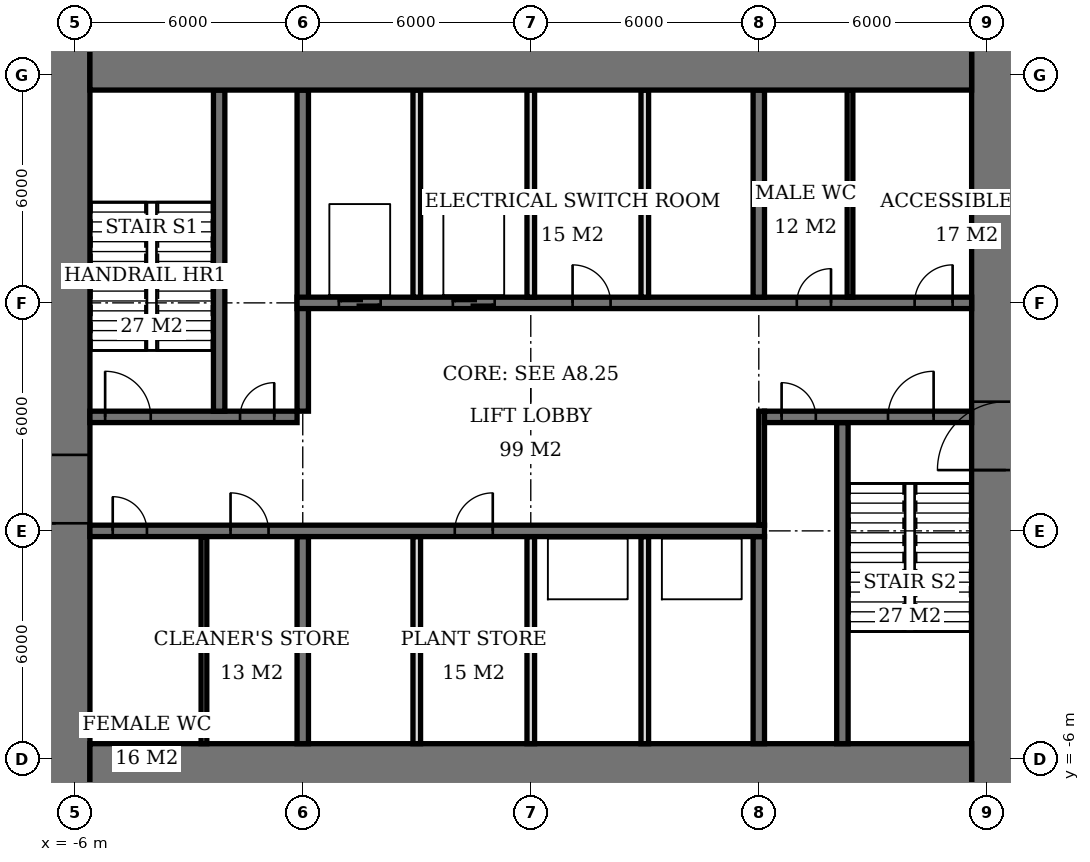
"""IFC4 building model, lengths in metres.
Left out: names, types, materials, properties, quantities, classifications, styles, units other than length and angle.
Written with IfcOpenShell. Run it as: python <this file> out.ifc"""

import sys

from ifc_helpers import new_model, si_unit, direction, frame, frame_2d, origin, place, context, subcontext, project, spatial, rectangle, extrude, element, fill, save


model = new_model("IFC4")
c1 = context("Model", 3, precision=1e-05, world=origin(), true_north=direction((0.0, 1.0)))
c2 = subcontext(c1, "Body", "Model", "MODEL_VIEW")
j1 = project(units=[si_unit("LENGTHUNIT", "METRE"), si_unit("PLANEANGLEUNIT", "RADIAN")], contexts=[c1])
p1 = place(None, origin())
s1 = spatial("IfcSite", under=j1, at=p1, CompositionType="ELEMENT")
p2 = place(p1, origin())
s2 = spatial("IfcBuilding", under=s1, at=p2, CompositionType="ELEMENT")
p3 = place(p2, frame((0.0, 0.0, 164.0)))
s3 = spatial("IfcBuildingStorey", under=s2, at=p3, CompositionType="ELEMENT", Elevation=164.0)
for number, where, z_axis, x_axis in (
    (1, (-5.6, -6.6, 0.0), (0.0, 0.0, 1.0), (1.0, 0.0, 0.0)),
    (2, (-5.6, 12.6, 0.0), (0.0, 0.0, 1.0), (1.0, 0.0, 0.0)),
):
    element("IfcWall", number, at=place(p3, frame(where, z_axis=z_axis, x_axis=x_axis)), inside=s3, PredefinedType="SHEAR", context=c2, shape_type="SweptSolid", body=[
        extrude(rectangle(XDim=23.2, YDim=2.0, at=frame_2d((11.6, 0.0))), origin(), (0.0, 0.0, 1.0), 5.4),
    ])
p4 = place(p3, frame((-6.5, -7.6, 0.0), z_axis=(0.0, 0.0, 1.0), x_axis=(0.0, 1.0, 0.0)))
e3 = element("IfcWall", 3, at=p4, inside=s3, PredefinedType="SHEAR", context=c2, shape_type="SweptSolid", body=[
    extrude(rectangle(XDim=21.2, YDim=1.8, at=frame_2d((10.6, 0.0))), origin(), (0.0, 0.0, 1.0), 5.4),
])
p5 = place(p4, frame((7.8, 0.0, 0.0)))
e4 = element("IfcOpeningElement", 4, at=p5, cuts=e3, PredefinedType="OPENING", context=c2, shape_type="SweptSolid", body=[
    extrude(rectangle(XDim=1.8, YDim=2.4, at=frame_2d((0.9, 1.2))), frame((0.0, 0.91, 0.0), z_axis=(0.0, -1.0, 0.0), x_axis=(1.0, 0.0, 0.0)), (0.0, 0.0, 1.0), 1.82),
])
p6 = place(p3, frame((18.5, -7.6, 0.0), z_axis=(0.0, 0.0, 1.0), x_axis=(0.0, 1.0, 0.0)))
e5 = element("IfcWall", 5, at=p6, inside=s3, PredefinedType="SHEAR", context=c2, shape_type="SweptSolid", body=[
    extrude(rectangle(XDim=21.2, YDim=1.8, at=frame_2d((10.6, 0.0))), origin(), (0.0, 0.0, 1.0), 5.4),
])
p7 = place(p6, frame((9.2, 0.0, 0.0)))
e6 = element("IfcOpeningElement", 6, at=p7, cuts=e5, PredefinedType="OPENING", context=c2, shape_type="SweptSolid", body=[
    extrude(rectangle(XDim=1.8, YDim=2.4, at=frame_2d((0.9, 1.2))), frame((0.0, 0.91, 0.0), z_axis=(0.0, -1.0, 0.0), x_axis=(1.0, 0.0, 0.0)), (0.0, 0.0, 1.0), 1.82),
])
p8 = place(p3, frame((-5.6, 0.0, 0.0), z_axis=(0.0, 0.0, 1.0), x_axis=(1.0, 0.0, 0.0)))
e7 = element("IfcWall", 7, at=p8, inside=s3, PredefinedType="SHEAR", context=c2, shape_type="SweptSolid", body=[
    extrude(rectangle(XDim=17.75, YDim=0.3, at=frame_2d((8.875, 0.0))), origin(), (0.0, 0.0, 1.0), 5.4),
])
p9 = place(p8, frame((0.6, 0.0, 0.0)))
e8 = element("IfcOpeningElement", 8, at=p9, cuts=e7, PredefinedType="OPENING", context=c2, shape_type="SweptSolid", body=[
    extrude(rectangle(XDim=0.9, YDim=2.1, at=frame_2d((0.45, 1.05))), frame((0.0, 0.16, 0.0), z_axis=(0.0, -1.0, 0.0), x_axis=(1.0, 0.0, 0.0)), (0.0, 0.0, 1.0), 0.32),
])
p10 = place(p8, frame((3.7, 0.0, 0.0)))
e9 = element("IfcOpeningElement", 9, at=p10, cuts=e7, PredefinedType="OPENING", context=c2, shape_type="SweptSolid", body=[
    extrude(rectangle(XDim=1.0, YDim=2.1, at=frame_2d((0.5, 1.05))), frame((0.0, 0.16, 0.0), z_axis=(0.0, -1.0, 0.0), x_axis=(1.0, 0.0, 0.0)), (0.0, 0.0, 1.0), 0.32),
])
p11 = place(p8, frame((9.6, 0.0, 0.0)))
e10 = element("IfcOpeningElement", 10, at=p11, cuts=e7, PredefinedType="OPENING", context=c2, shape_type="SweptSolid", body=[
    extrude(rectangle(XDim=1.0, YDim=2.1, at=frame_2d((0.5, 1.05))), frame((0.0, 0.16, 0.0), z_axis=(0.0, -1.0, 0.0), x_axis=(1.0, 0.0, 0.0)), (0.0, 0.0, 1.0), 0.32),
])
p12 = place(p3, frame((-5.6, 3.0, 0.0), z_axis=(0.0, 0.0, 1.0), x_axis=(1.0, 0.0, 0.0)))
e11 = element("IfcWall", 11, at=p12, inside=s3, PredefinedType="SHEAR", context=c2, shape_type="SweptSolid", body=[
    extrude(rectangle(XDim=5.45, YDim=0.3, at=frame_2d((2.725, 0.0))), origin(), (0.0, 0.0, 1.0), 5.4),
])
p13 = place(p12, frame((0.4, 0.0, 0.0)))
e12 = element("IfcOpeningElement", 12, at=p13, cuts=e11, PredefinedType="OPENING", context=c2, shape_type="SweptSolid", body=[
    extrude(rectangle(XDim=1.2, YDim=2.1, at=frame_2d((0.6, 1.05))), frame((0.0, 0.16, 0.0), z_axis=(0.0, -1.0, 0.0), x_axis=(1.0, 0.0, 0.0)), (0.0, 0.0, 1.0), 0.32),
])
p14 = place(p12, frame((3.95, 0.0, 0.0)))
e13 = element("IfcOpeningElement", 13, at=p14, cuts=e11, PredefinedType="OPENING", context=c2, shape_type="SweptSolid", body=[
    extrude(rectangle(XDim=0.9, YDim=2.1, at=frame_2d((0.45, 1.05))), frame((0.0, 0.16, 0.0), z_axis=(0.0, -1.0, 0.0), x_axis=(1.0, 0.0, 0.0)), (0.0, 0.0, 1.0), 0.32),
])
p15 = place(p3, frame((12.15, 3.0, 0.0), z_axis=(0.0, 0.0, 1.0), x_axis=(1.0, 0.0, 0.0)))
e14 = element("IfcWall", 14, at=p15, inside=s3, PredefinedType="SHEAR", context=c2, shape_type="SweptSolid", body=[
    extrude(rectangle(XDim=5.45, YDim=0.3, at=frame_2d((2.725, 0.0))), origin(), (0.0, 0.0, 1.0), 5.4),
])
p16 = place(p15, frame((3.25, 0.0, 0.0)))
e15 = element("IfcOpeningElement", 15, at=p16, cuts=e14, PredefinedType="OPENING", context=c2, shape_type="SweptSolid", body=[
    extrude(rectangle(XDim=1.2, YDim=2.1, at=frame_2d((0.6, 1.05))), frame((0.0, 0.16, 0.0), z_axis=(0.0, -1.0, 0.0), x_axis=(1.0, 0.0, 0.0)), (0.0, 0.0, 1.0), 0.32),
])
p17 = place(p15, frame((0.45, 0.0, 0.0)))
e16 = element("IfcOpeningElement", 16, at=p17, cuts=e14, PredefinedType="OPENING", context=c2, shape_type="SweptSolid", body=[
    extrude(rectangle(XDim=0.9, YDim=2.1, at=frame_2d((0.45, 1.05))), frame((0.0, 0.16, 0.0), z_axis=(0.0, -1.0, 0.0), x_axis=(1.0, 0.0, 0.0)), (0.0, 0.0, 1.0), 0.32),
])
p18 = place(p3, frame((-0.15, 6.0, 0.0), z_axis=(0.0, 0.0, 1.0), x_axis=(1.0, 0.0, 0.0)))
e17 = element("IfcWall", 17, at=p18, inside=s3, PredefinedType="SHEAR", context=c2, shape_type="SweptSolid", body=[
    extrude(rectangle(XDim=17.75, YDim=0.3, at=frame_2d((8.875, 0.0))), origin(), (0.0, 0.0, 1.0), 5.4),
])
p19 = place(p18, frame((13.15, 0.0, 0.0)))
e18 = element("IfcOpeningElement", 18, at=p19, cuts=e17, PredefinedType="OPENING", context=c2, shape_type="SweptSolid", body=[
    extrude(rectangle(XDim=0.9, YDim=2.1, at=frame_2d((0.45, 1.05))), frame((0.0, 0.16, 0.0), z_axis=(0.0, -1.0, 0.0), x_axis=(1.0, 0.0, 0.0)), (0.0, 0.0, 1.0), 0.32),
])
p20 = place(p18, frame((16.25, 0.0, 0.0)))
e19 = element("IfcOpeningElement", 19, at=p20, cuts=e17, PredefinedType="OPENING", context=c2, shape_type="SweptSolid", body=[
    extrude(rectangle(XDim=1.0, YDim=2.1, at=frame_2d((0.5, 1.05))), frame((0.0, 0.16, 0.0), z_axis=(0.0, -1.0, 0.0), x_axis=(1.0, 0.0, 0.0)), (0.0, 0.0, 1.0), 0.32),
])
p21 = place(p18, frame((7.25, 0.0, 0.0)))
e20 = element("IfcOpeningElement", 20, at=p21, cuts=e17, PredefinedType="OPENING", context=c2, shape_type="SweptSolid", body=[
    extrude(rectangle(XDim=1.0, YDim=2.1, at=frame_2d((0.5, 1.05))), frame((0.0, 0.16, 0.0), z_axis=(0.0, -1.0, 0.0), x_axis=(1.0, 0.0, 0.0)), (0.0, 0.0, 1.0), 0.32),
])
p22 = place(p18, frame((1.1, 0.0, 0.0)))
e21 = element("IfcOpeningElement", 21, at=p22, cuts=e17, PredefinedType="OPENING", context=c2, shape_type="SweptSolid", body=[
    extrude(rectangle(XDim=1.1, YDim=2.1, at=frame_2d((0.55, 1.05))), frame((0.0, 0.16, 0.0), z_axis=(0.0, -1.0, 0.0), x_axis=(1.0, 0.0, 0.0)), (0.0, 0.0, 1.0), 0.32),
])
p23 = place(p18, frame((4.1, 0.0, 0.0)))
e22 = element("IfcOpeningElement", 22, at=p23, cuts=e17, PredefinedType="OPENING", context=c2, shape_type="SweptSolid", body=[
    extrude(rectangle(XDim=1.1, YDim=2.1, at=frame_2d((0.55, 1.05))), frame((0.0, 0.16, 0.0), z_axis=(0.0, -1.0, 0.0), x_axis=(1.0, 0.0, 0.0)), (0.0, 0.0, 1.0), 0.32),
])
p24 = place(p3, frame((0.0, -5.6, 0.0), z_axis=(0.0, 0.0, 1.0), x_axis=(0.0, 1.0, 0.0)))
e23 = element("IfcWall", 23, at=p24, inside=s3, PredefinedType="SHEAR", context=c2, shape_type="SweptSolid", body=[
    extrude(rectangle(XDim=5.45, YDim=0.3, at=frame_2d((2.725, 0.0))), origin(), (0.0, 0.0, 1.0), 5.4),
])
p25 = place(p3, frame((0.0, 3.15, 0.0), z_axis=(0.0, 0.0, 1.0), x_axis=(0.0, 1.0, 0.0)))
e24 = element("IfcWall", 24, at=p25, inside=s3, PredefinedType="SHEAR", context=c2, shape_type="SweptSolid", body=[
    extrude(rectangle(XDim=8.45, YDim=0.3, at=frame_2d((4.225, 0.0))), origin(), (0.0, 0.0, 1.0), 5.4),
])
for number, where, z_axis, x_axis in (
    (25, (12.0, -5.6, 0.0), (0.0, 0.0, 1.0), (0.0, 1.0, 0.0)),
    (26, (12.0, 6.15, 0.0), (0.0, 0.0, 1.0), (0.0, 1.0, 0.0)),
):
    element("IfcWall", number, at=place(p3, frame(where, z_axis=z_axis, x_axis=x_axis)), inside=s3, PredefinedType="SHEAR", context=c2, shape_type="SweptSolid", body=[
        extrude(rectangle(XDim=5.45, YDim=0.3, at=frame_2d((2.725, 0.0))), origin(), (0.0, 0.0, 1.0), 5.4),
    ])
for number, where, z_axis, x_axis in (
    (27, (-2.2, 3.15, 0.0), (0.0, 0.0, 1.0), (0.0, 1.0, 0.0)),
    (28, (14.2, -5.6, 0.0), (0.0, 0.0, 1.0), (0.0, 1.0, 0.0)),
):
    element("IfcWall", number, at=place(p3, frame(where, z_axis=z_axis, x_axis=x_axis)), inside=s3, PredefinedType="SHEAR", context=c2, shape_type="SweptSolid", body=[
        extrude(rectangle(XDim=8.45, YDim=0.3, at=frame_2d((4.225, 0.0))), origin(), (0.0, 0.0, 1.0), 5.4),
    ])
for number, where, z_axis, x_axis in (
    (29, (3.0, 6.15, 0.0), (0.0, 0.0, 1.0), (0.0, 1.0, 0.0)),
    (30, (6.0, 6.15, 0.0), (0.0, 0.0, 1.0), (0.0, 1.0, 0.0)),
    (31, (9.0, 6.15, 0.0), (0.0, 0.0, 1.0), (0.0, 1.0, 0.0)),
    (32, (3.0, -5.6, 0.0), (0.0, 0.0, 1.0), (0.0, 1.0, 0.0)),
    (33, (6.0, -5.6, 0.0), (0.0, 0.0, 1.0), (0.0, 1.0, 0.0)),
    (34, (9.0, -5.6, 0.0), (0.0, 0.0, 1.0), (0.0, 1.0, 0.0)),
):
    element("IfcWall", number, at=place(p3, frame(where, z_axis=z_axis, x_axis=x_axis)), inside=s3, PredefinedType="SOLIDWALL", context=c2, shape_type="SweptSolid", body=[
        extrude(rectangle(XDim=5.45, YDim=0.2, at=frame_2d((2.725, 0.0))), origin(), (0.0, 0.0, 1.0), 5.4),
    ])
p26 = place(p3, frame((-13.329, -6.651, 0.0), z_axis=(0.0, 0.0, 1.0), x_axis=(0.707106781187, -0.707106781187, 0.0)))
e35 = element("IfcWall", 35, at=p26, inside=s3, PredefinedType="USERDEFINED", context=c2, shape_type="SweptSolid", body=[
    extrude(rectangle(XDim=9.445, YDim=0.2, at=frame_2d((4.723, 0.0))), origin(), (0.0, 0.0, 1.0), 5.4),
])
p27 = place(p26, frame((0.274, 0.0, 0.6)))
e36 = element("IfcOpeningElement", 36, at=p27, cuts=e35, PredefinedType="OPENING", context=c2, shape_type="SweptSolid", body=[
    extrude(rectangle(XDim=2.6, YDim=3.0, at=frame_2d((1.3, 1.5))), frame((0.0, 0.11, 0.0), z_axis=(0.0, -1.0, 0.0), x_axis=(1.0, 0.0, 0.0)), (0.0, 0.0, 1.0), 0.22),
])
p28 = place(p26, frame((3.423, 0.0, 0.6)))
e37 = element("IfcOpeningElement", 37, at=p28, cuts=e35, PredefinedType="OPENING", context=c2, shape_type="SweptSolid", body=[
    extrude(rectangle(XDim=2.6, YDim=3.0, at=frame_2d((1.3, 1.5))), frame((0.0, 0.11, 0.0), z_axis=(0.0, -1.0, 0.0), x_axis=(1.0, 0.0, 0.0)), (0.0, 0.0, 1.0), 0.22),
])
p29 = place(p26, frame((6.571, 0.0, 0.6)))
e38 = element("IfcOpeningElement", 38, at=p29, cuts=e35, PredefinedType="OPENING", context=c2, shape_type="SweptSolid", body=[
    extrude(rectangle(XDim=2.6, YDim=3.0, at=frame_2d((1.3, 1.5))), frame((0.0, 0.11, 0.0), z_axis=(0.0, -1.0, 0.0), x_axis=(1.0, 0.0, 0.0)), (0.0, 0.0, 1.0), 0.22),
])
for number, where, z_axis, x_axis in (
    (39, (-2.6, -5.6, 0.0), (0.0, 0.0, 1.0), (0.0, 1.0, 0.0)),
    (40, (14.4, 6.15, 0.0), (0.0, 0.0, 1.0), (0.0, 1.0, 0.0)),
):
    element("IfcWall", number, at=place(p3, frame(where, z_axis=z_axis, x_axis=x_axis)), inside=s3, PredefinedType="PLUMBINGWALL", context=c2, shape_type="SweptSolid", body=[
        extrude(rectangle(XDim=5.45, YDim=0.15, at=frame_2d((2.725, 0.0))), origin(), (0.0, 0.0, 1.0), 5.15),
    ])
p30 = place(p3, frame((12.075, 0.15, 0.0), z_axis=(0.0, 0.0, 1.0), x_axis=(0.0, 1.0, 0.0)))
e41 = element("IfcWall", 41, at=p30, inside=s3, PredefinedType="PARTITIONING", context=c2, shape_type="SweptSolid", body=[
    extrude(rectangle(XDim=3.0, YDim=0.15, at=frame_2d((1.5, 0.0))), origin(), (0.0, 0.0, 1.0), 5.15),
])
p31 = place(p5, origin())
e42 = element("IfcDoor", 42, at=p31, inside=s3, OperationType="DOUBLE_DOOR_SINGLE_SWING", PredefinedType="DOOR", context=c2, shape_type="SweptSolid", body=[
    extrude(rectangle(XDim=1.8, YDim=2.4, at=frame_2d((0.9, 1.2))), frame((0.0, 0.025, 0.0), z_axis=(0.0, -1.0, 0.0), x_axis=(1.0, 0.0, 0.0)), (0.0, 0.0, 1.0), 0.05),
])
fill(e4, e42)
p32 = place(p7, origin())
e43 = element("IfcDoor", 43, at=p32, inside=s3, OperationType="DOUBLE_DOOR_SINGLE_SWING", PredefinedType="DOOR", context=c2, shape_type="SweptSolid", body=[
    extrude(rectangle(XDim=1.8, YDim=2.4, at=frame_2d((0.9, 1.2))), frame((0.0, 0.025, 0.0), z_axis=(0.0, -1.0, 0.0), x_axis=(1.0, 0.0, 0.0)), (0.0, 0.0, 1.0), 0.05),
])
fill(e6, e43)
p33 = place(p13, origin())
e44 = element("IfcDoor", 44, at=p33, inside=s3, OperationType="SINGLE_SWING_LEFT", PredefinedType="DOOR", context=c2, shape_type="SweptSolid", body=[
    extrude(rectangle(XDim=1.2, YDim=2.1, at=frame_2d((0.6, 1.05))), frame((0.0, 0.025, 0.0), z_axis=(0.0, -1.0, 0.0), x_axis=(1.0, 0.0, 0.0)), (0.0, 0.0, 1.0), 0.05),
])
fill(e12, e44)
p34 = place(p14, origin())
e45 = element("IfcDoor", 45, at=p34, inside=s3, OperationType="SINGLE_SWING_RIGHT", PredefinedType="DOOR", context=c2, shape_type="SweptSolid", body=[
    extrude(rectangle(XDim=0.9, YDim=2.1, at=frame_2d((0.45, 1.05))), frame((0.0, 0.025, 0.0), z_axis=(0.0, -1.0, 0.0), x_axis=(1.0, 0.0, 0.0)), (0.0, 0.0, 1.0), 0.05),
])
fill(e13, e45)
p35 = place(p16, origin())
e46 = element("IfcDoor", 46, at=p35, inside=s3, OperationType="SINGLE_SWING_RIGHT", PredefinedType="DOOR", context=c2, shape_type="SweptSolid", body=[
    extrude(rectangle(XDim=1.2, YDim=2.1, at=frame_2d((0.6, 1.05))), frame((0.0, 0.025, 0.0), z_axis=(0.0, -1.0, 0.0), x_axis=(1.0, 0.0, 0.0)), (0.0, 0.0, 1.0), 0.05),
])
fill(e15, e46)
p36 = place(p17, origin())
e47 = element("IfcDoor", 47, at=p36, inside=s3, OperationType="SINGLE_SWING_LEFT", PredefinedType="DOOR", context=c2, shape_type="SweptSolid", body=[
    extrude(rectangle(XDim=0.9, YDim=2.1, at=frame_2d((0.45, 1.05))), frame((0.0, 0.025, 0.0), z_axis=(0.0, -1.0, 0.0), x_axis=(1.0, 0.0, 0.0)), (0.0, 0.0, 1.0), 0.05),
])
fill(e16, e47)
p37 = place(p9, origin())
e48 = element("IfcDoor", 48, at=p37, inside=s3, OperationType="SINGLE_SWING_LEFT", PredefinedType="DOOR", context=c2, shape_type="SweptSolid", body=[
    extrude(rectangle(XDim=0.9, YDim=2.1, at=frame_2d((0.45, 1.05))), frame((0.0, 0.025, 0.0), z_axis=(0.0, -1.0, 0.0), x_axis=(1.0, 0.0, 0.0)), (0.0, 0.0, 1.0), 0.05),
])
fill(e8, e48)
p38 = place(p10, origin())
e49 = element("IfcDoor", 49, at=p38, inside=s3, OperationType="SINGLE_SWING_LEFT", PredefinedType="DOOR", context=c2, shape_type="SweptSolid", body=[
    extrude(rectangle(XDim=1.0, YDim=2.1, at=frame_2d((0.5, 1.05))), frame((0.0, 0.025, 0.0), z_axis=(0.0, -1.0, 0.0), x_axis=(1.0, 0.0, 0.0)), (0.0, 0.0, 1.0), 0.05),
])
fill(e9, e49)
p39 = place(p19, origin())
e50 = element("IfcDoor", 50, at=p39, inside=s3, OperationType="SINGLE_SWING_RIGHT", PredefinedType="DOOR", context=c2, shape_type="SweptSolid", body=[
    extrude(rectangle(XDim=0.9, YDim=2.1, at=frame_2d((0.45, 1.05))), frame((0.0, 0.025, 0.0), z_axis=(0.0, -1.0, 0.0), x_axis=(1.0, 0.0, 0.0)), (0.0, 0.0, 1.0), 0.05),
])
fill(e18, e50)
p40 = place(p20, origin())
e51 = element("IfcDoor", 51, at=p40, inside=s3, OperationType="SINGLE_SWING_RIGHT", PredefinedType="DOOR", context=c2, shape_type="SweptSolid", body=[
    extrude(rectangle(XDim=1.0, YDim=2.1, at=frame_2d((0.5, 1.05))), frame((0.0, 0.025, 0.0), z_axis=(0.0, -1.0, 0.0), x_axis=(1.0, 0.0, 0.0)), (0.0, 0.0, 1.0), 0.05),
])
fill(e19, e51)
p41 = place(p21, origin())
e52 = element("IfcDoor", 52, at=p41, inside=s3, OperationType="SINGLE_SWING_LEFT", PredefinedType="DOOR", context=c2, shape_type="SweptSolid", body=[
    extrude(rectangle(XDim=1.0, YDim=2.1, at=frame_2d((0.5, 1.05))), frame((0.0, 0.025, 0.0), z_axis=(0.0, -1.0, 0.0), x_axis=(1.0, 0.0, 0.0)), (0.0, 0.0, 1.0), 0.05),
])
fill(e20, e52)
p42 = place(p11, origin())
e53 = element("IfcDoor", 53, at=p42, inside=s3, OperationType="SINGLE_SWING_RIGHT", PredefinedType="DOOR", context=c2, shape_type="SweptSolid", body=[
    extrude(rectangle(XDim=1.0, YDim=2.1, at=frame_2d((0.5, 1.05))), frame((0.0, 0.025, 0.0), z_axis=(0.0, -1.0, 0.0), x_axis=(1.0, 0.0, 0.0)), (0.0, 0.0, 1.0), 0.05),
])
fill(e10, e53)
p43 = place(p22, origin())
e54 = element("IfcDoor", 54, at=p43, inside=s3, OperationType="DOUBLE_DOOR_SLIDING", PredefinedType="USERDEFINED", context=c2, shape_type="SweptSolid", body=[
    extrude(rectangle(XDim=1.1, YDim=2.1, at=frame_2d((0.55, 1.05))), frame((0.0, 0.025, 0.0), z_axis=(0.0, -1.0, 0.0), x_axis=(1.0, 0.0, 0.0)), (0.0, 0.0, 1.0), 0.05),
])
fill(e21, e54)
p44 = place(p23, origin())
e55 = element("IfcDoor", 55, at=p44, inside=s3, OperationType="DOUBLE_DOOR_SLIDING", PredefinedType="USERDEFINED", context=c2, shape_type="SweptSolid", body=[
    extrude(rectangle(XDim=1.1, YDim=2.1, at=frame_2d((0.55, 1.05))), frame((0.0, 0.025, 0.0), z_axis=(0.0, -1.0, 0.0), x_axis=(1.0, 0.0, 0.0)), (0.0, 0.0, 1.0), 0.05),
])
fill(e22, e55)
save(model, sys.argv[1])
